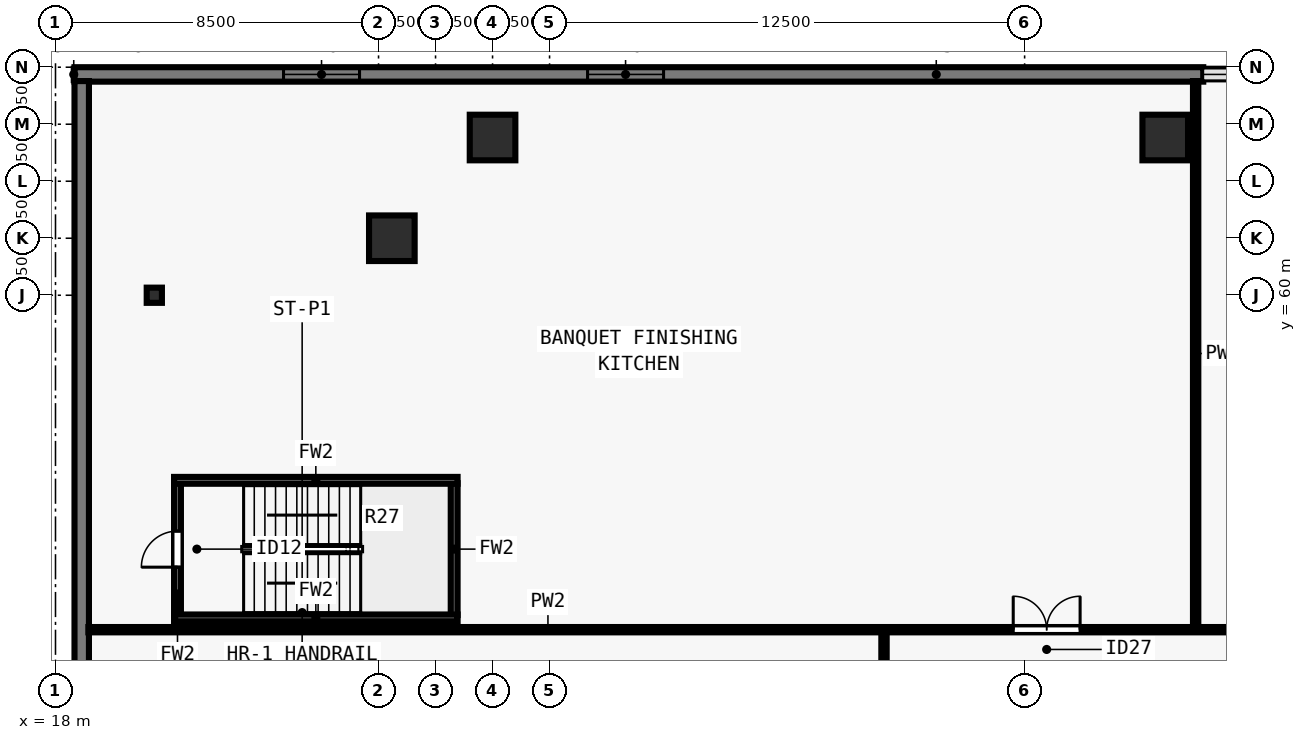
"""IFC4 building model, lengths in metres.
Left out: names, types, materials, properties, quantities, classifications, styles, units other than length and angle.
Written with IfcOpenShell. Run it as: python <this file> out.ifc"""

import sys

from ifc_helpers import new_model, si_unit, direction, frame, frame_2d, origin, origin_2d, place, context, subcontext, project, spatial, rectangle, i_section, extrude, element, fill, save


model = new_model("IFC4")
c1 = context("Model", 3, precision=1e-05, world=origin(), true_north=direction((0.0, 1.0)))
c2 = subcontext(c1, "Body", "Model", "MODEL_VIEW")
j1 = project(units=[si_unit("LENGTHUNIT", "METRE"), si_unit("PLANEANGLEUNIT", "RADIAN")], contexts=[c1])
p1 = place(None, origin())
s1 = spatial("IfcSite", under=j1, at=p1, CompositionType="ELEMENT")
p2 = place(p1, origin())
s2 = spatial("IfcBuilding", under=s1, at=p2, CompositionType="ELEMENT")
p3 = place(p2, frame((0.0, 0.0, 10.0)))
s3 = spatial("IfcBuildingStorey", under=s2, at=p3, CompositionType="ELEMENT", Elevation=10.0)
for number, where, z_axis, x_axis in (
    (1, (47.2, 64.15, 0.0), (0.0, 0.0, 1.0), (1.0, 0.0, 0.0)),
    (2, (29.5, 64.15, 0.0), (0.0, 0.0, 1.0), (1.0, 0.0, 0.0)),
    (3, (26.85, 61.5, 0.0), (0.0, 0.0, 1.0), (1.0, 0.0, 0.0)),
):
    element("IfcColumn", number, at=place(p3, frame(where, z_axis=z_axis, x_axis=x_axis)), inside=s3, PredefinedType="COLUMN", context=c2, shape_type="SweptSolid", body=[
        extrude(rectangle(XDim=1.2, YDim=1.2, at=origin_2d()), origin(), (0.0, 0.0, 1.0), 4.5),
    ])
p4 = place(p3, frame((20.6, 60.0, 0.0), z_axis=(0.0, 0.0, 1.0), x_axis=(1.0, 0.0, 0.0)))
e4 = element("IfcColumn", 4, at=p4, inside=s3, PredefinedType="COLUMN", context=c2, shape_type="SweptSolid", body=[
    extrude(i_section(OverallWidth=0.4, OverallDepth=0.4, WebThickness=0.028, FlangeThickness=0.045, at=origin_2d()), origin(), (0.0, 0.0, 1.0), 4.5),
])
p5 = place(p3, frame((18.5, 65.81, 0.0), z_axis=(0.0, 0.0, 1.0), x_axis=(1.0, 0.0, 0.0)))
e5 = element("IfcWall", 5, at=p5, inside=s3, PredefinedType="SOLIDWALL", context=c2, shape_type="SweptSolid", body=[
    extrude(rectangle(XDim=29.7, YDim=0.38, at=frame_2d((14.85, 0.0))), origin(), (0.0, 0.0, 1.0), 4.22),
])
p6 = place(p5, frame((5.5, 0.0, 0.8)))
e6 = element("IfcOpeningElement", 6, at=p6, cuts=e5, PredefinedType="OPENING", context=c2, shape_type="SweptSolid", body=[
    extrude(rectangle(XDim=2.0, YDim=2.346, at=frame_2d((1.0, 1.173))), frame((0.0, 0.2, 0.0), z_axis=(0.0, -1.0, 0.0), x_axis=(1.0, 0.0, 0.0)), (0.0, 0.0, 1.0), 0.4),
])
p7 = place(p5, frame((13.5, 0.0, 0.8)))
e7 = element("IfcOpeningElement", 7, at=p7, cuts=e5, PredefinedType="OPENING", context=c2, shape_type="SweptSolid", body=[
    extrude(rectangle(XDim=2.0, YDim=2.346, at=frame_2d((1.0, 1.173))), frame((0.0, 0.2, 0.0), z_axis=(0.0, -1.0, 0.0), x_axis=(1.0, 0.0, 0.0)), (0.0, 0.0, 1.0), 0.4),
])
p8 = place(p3, frame((18.69, 12.365, 0.0), z_axis=(0.0, 0.0, 1.0), x_axis=(0.0, 1.0, 0.0)))
e8 = element("IfcWall", 8, at=p8, inside=s3, PredefinedType="SOLIDWALL", context=c2, shape_type="SweptSolid", body=[
    extrude(rectangle(XDim=53.27, YDim=0.38, at=frame_2d((26.635, 0.0))), origin(), (0.0, 0.0, 1.0), 4.22),
])
p9 = place(p3, frame((18.865, 51.2, 0.0), z_axis=(0.0, 0.0, 1.0), x_axis=(1.0, 0.0, 0.0)))
e9 = element("IfcWall", 9, at=p9, inside=s3, PredefinedType="PARTITIONING", context=c2, shape_type="SweptSolid", body=[
    extrude(rectangle(XDim=66.27, YDim=0.14, at=frame_2d((33.135, 0.0))), origin(), (0.0, 0.0, 1.0), 3.738),
])
p10 = place(p9, frame((24.335, 0.0, 0.0)))
e10 = element("IfcOpeningElement", 10, at=p10, cuts=e9, PredefinedType="OPENING", context=c2, shape_type="SweptSolid", body=[
    extrude(rectangle(XDim=1.76, YDim=2.2, at=frame_2d((0.88, 1.1))), frame((0.0, 0.08, 0.0), z_axis=(0.0, -1.0, 0.0), x_axis=(1.0, 0.0, 0.0)), (0.0, 0.0, 1.0), 0.16),
])
p11 = place(p9, frame((37.135, 0.0, 0.0)))
e11 = element("IfcOpeningElement", 11, at=p11, cuts=e9, PredefinedType="OPENING", context=c2, shape_type="SweptSolid", body=[
    extrude(rectangle(XDim=1.76, YDim=2.2, at=frame_2d((0.88, 1.1))), frame((0.0, 0.08, 0.0), z_axis=(0.0, -1.0, 0.0), x_axis=(1.0, 0.0, 0.0)), (0.0, 0.0, 1.0), 0.16),
])
p12 = place(p9, frame((51.135, 0.0, 0.0)))
e12 = element("IfcOpeningElement", 12, at=p12, cuts=e9, PredefinedType="OPENING", context=c2, shape_type="SweptSolid", body=[
    extrude(rectangle(XDim=0.95, YDim=2.1, at=frame_2d((0.475, 1.05))), frame((0.0, 0.08, 0.0), z_axis=(0.0, -1.0, 0.0), x_axis=(1.0, 0.0, 0.0)), (0.0, 0.0, 1.0), 0.16),
])
p13 = place(p9, frame((55.335, 0.0, 0.0)))
e13 = element("IfcOpeningElement", 13, at=p13, cuts=e9, PredefinedType="OPENING", context=c2, shape_type="SweptSolid", body=[
    extrude(rectangle(XDim=1.76, YDim=2.2, at=frame_2d((0.88, 1.1))), frame((0.0, 0.08, 0.0), z_axis=(0.0, -1.0, 0.0), x_axis=(1.0, 0.0, 0.0)), (0.0, 0.0, 1.0), 0.16),
])
p14 = place(p3, frame((39.8, 26.855, 0.0), z_axis=(0.0, 0.0, 1.0), x_axis=(0.0, 1.0, 0.0)))
e14 = element("IfcWall", 14, at=p14, inside=s3, PredefinedType="PARTITIONING", context=c2, shape_type="SweptSolid", body=[
    extrude(rectangle(XDim=24.29, YDim=0.14, at=frame_2d((12.145, 0.0))), origin(), (0.0, 0.0, 1.0), 4.22),
])
p15 = place(p14, frame((10.945, 0.0, 0.0)))
e15 = element("IfcOpeningElement", 15, at=p15, cuts=e14, PredefinedType="OPENING", context=c2, shape_type="SweptSolid", body=[
    extrude(rectangle(XDim=1.76, YDim=2.2, at=frame_2d((0.88, 1.1))), frame((0.0, 0.08, 0.0), z_axis=(0.0, -1.0, 0.0), x_axis=(1.0, 0.0, 0.0)), (0.0, 0.0, 1.0), 0.16),
])
p16 = place(p3, frame((48.0, 51.3, 0.0), z_axis=(0.0, 0.0, 1.0), x_axis=(0.0, 1.0, 0.0)))
e16 = element("IfcWall", 16, at=p16, inside=s3, PredefinedType="PARTITIONING", context=c2, shape_type="SweptSolid", body=[
    extrude(rectangle(XDim=14.335, YDim=0.14, at=frame_2d((7.167, 0.0))), origin(), (0.0, 0.0, 1.0), 4.22),
])
p17 = place(p3, frame((21.21, 51.585, 0.0), z_axis=(0.0, 0.0, 1.0), x_axis=(0.0, 1.0, 0.0)))
e17 = element("IfcWall", 17, at=p17, inside=s3, PredefinedType="SOLIDWALL", context=c2, shape_type="SweptSolid", body=[
    extrude(rectangle(XDim=3.47, YDim=0.18, at=frame_2d((1.735, 0.0))), origin(), (0.0, 0.0, 1.0), 4.22),
])
p18 = place(p17, frame((1.26, 0.0, 0.0)))
e18 = element("IfcOpeningElement", 18, at=p18, cuts=e17, PredefinedType="OPENING", context=c2, shape_type="SweptSolid", body=[
    extrude(rectangle(XDim=0.95, YDim=2.15, at=frame_2d((0.475, 1.075))), frame((0.0, 0.1, 0.0), z_axis=(0.0, -1.0, 0.0), x_axis=(1.0, 0.0, 0.0)), (0.0, 0.0, 1.0), 0.2),
])
p19 = place(p3, frame((28.49, 51.585, 0.0), z_axis=(0.0, 0.0, 1.0), x_axis=(0.0, 1.0, 0.0)))
e19 = element("IfcWall", 19, at=p19, inside=s3, PredefinedType="SOLIDWALL", context=c2, shape_type="SweptSolid", body=[
    extrude(rectangle(XDim=3.47, YDim=0.18, at=frame_2d((1.735, 0.0))), origin(), (0.0, 0.0, 1.0), 4.22),
])
for number, where, z_axis, x_axis in (
    (20, (21.12, 51.51, 0.0), (0.0, 0.0, 1.0), (1.0, 0.0, 0.0)),
    (21, (21.12, 55.13, 0.0), (0.0, 0.0, 1.0), (1.0, 0.0, 0.0)),
):
    element("IfcWall", number, at=place(p3, frame(where, z_axis=z_axis, x_axis=x_axis)), inside=s3, PredefinedType="SOLIDWALL", context=c2, shape_type="SweptSolid", body=[
        extrude(rectangle(XDim=7.46, YDim=0.18, at=frame_2d((3.73, 0.0))), origin(), (0.0, 0.0, 1.0), 4.22),
    ])
p20 = place(p6, origin())
e22 = element("IfcWindow", 22, at=p20, inside=s3, PartitioningType="SINGLE_PANEL", PredefinedType="WINDOW", context=c2, shape_type="SweptSolid", body=[
    extrude(rectangle(XDim=2.0, YDim=2.346, at=frame_2d((1.0, 1.173))), frame((0.0, -0.05, 0.0), z_axis=(0.0, -1.0, 0.0), x_axis=(1.0, 0.0, 0.0)), (0.0, 0.0, 1.0), 0.06),
])
fill(e6, e22)
p21 = place(p7, origin())
e23 = element("IfcWindow", 23, at=p21, inside=s3, PartitioningType="SINGLE_PANEL", PredefinedType="WINDOW", context=c2, shape_type="SweptSolid", body=[
    extrude(rectangle(XDim=2.0, YDim=2.346, at=frame_2d((1.0, 1.173))), frame((0.0, -0.05, 0.0), z_axis=(0.0, -1.0, 0.0), x_axis=(1.0, 0.0, 0.0)), (0.0, 0.0, 1.0), 0.06),
])
fill(e7, e23)
p22 = place(p10, origin())
e24 = element("IfcDoor", 24, at=p22, inside=s3, OperationType="DOUBLE_DOOR_SINGLE_SWING", PredefinedType="DOOR", context=c2, shape_type="SweptSolid", body=[
    extrude(rectangle(XDim=1.76, YDim=2.2, at=frame_2d((0.88, 1.1))), frame((0.0, 0.025, 0.0), z_axis=(0.0, -1.0, 0.0), x_axis=(1.0, 0.0, 0.0)), (0.0, 0.0, 1.0), 0.05),
])
fill(e10, e24)
p23 = place(p18, origin())
e25 = element("IfcDoor", 25, at=p23, inside=s3, OperationType="SINGLE_SWING_LEFT", PredefinedType="DOOR", context=c2, shape_type="SweptSolid", body=[
    extrude(rectangle(XDim=0.95, YDim=2.15, at=frame_2d((0.475, 1.075))), frame((0.0, 0.025, 0.0), z_axis=(0.0, -1.0, 0.0), x_axis=(1.0, 0.0, 0.0)), (0.0, 0.0, 1.0), 0.05),
])
fill(e18, e25)
save(model, sys.argv[1])
